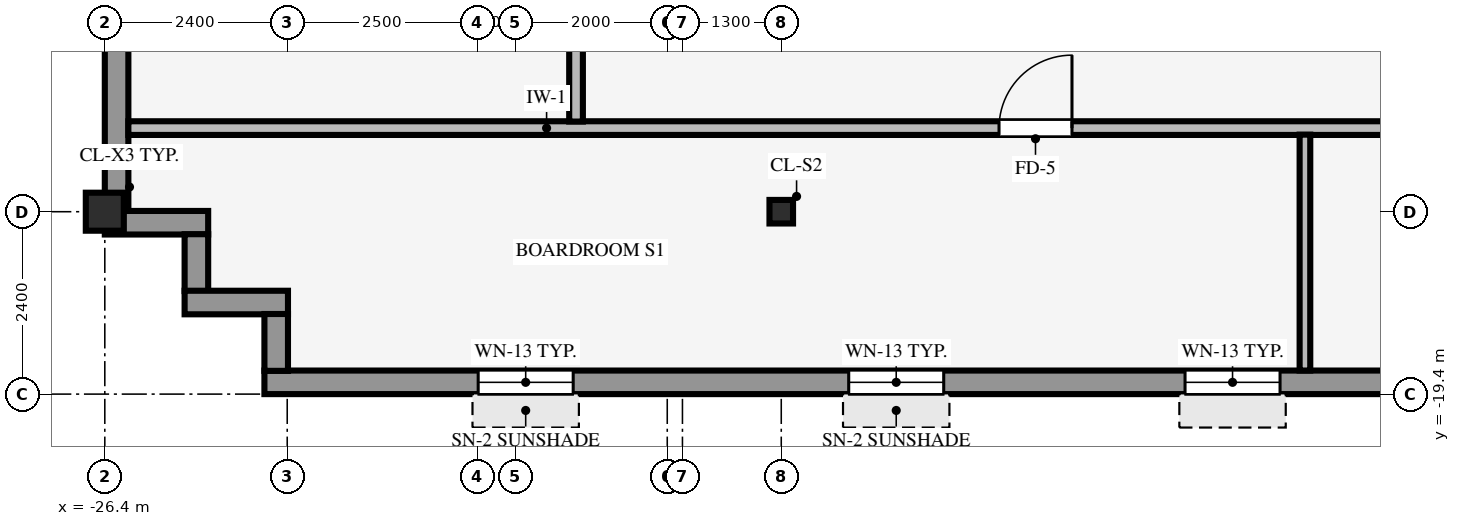
"""IFC4 building model, lengths in metres.
Left out: names, types, materials, properties, quantities, classifications, styles, units other than length and angle.
Written with IfcOpenShell. Run it as: python <this file> out.ifc"""

import sys

from ifc_helpers import new_model, si_unit, direction, frame, frame_2d, origin, origin_2d, place, context, subcontext, project, spatial, rectangle, hollow_rectangle, i_section, extrude, source, transform, mapped, element, fill, save


model = new_model("IFC4")
c1 = context("Model", 3, precision=1e-05, world=origin(), true_north=direction((0.0, 1.0)))
c2 = subcontext(c1, "Body", "Model", "MODEL_VIEW")
j1 = project(units=[si_unit("LENGTHUNIT", "METRE"), si_unit("PLANEANGLEUNIT", "RADIAN")], contexts=[c1])
p1 = place(None, origin())
s1 = spatial("IfcSite", under=j1, at=p1, CompositionType="ELEMENT")
p2 = place(p1, origin())
s2 = spatial("IfcBuilding", under=s1, at=p2, CompositionType="ELEMENT")
p3 = place(p2, frame((0.0, 0.0, 220.1)))
s3 = spatial("IfcBuildingStorey", under=s2, at=p3, CompositionType="ELEMENT", Elevation=220.1)
p4 = place(p3, frame((-26.4, -17.0, 0.0), z_axis=(0.0, 0.0, 1.0), x_axis=(1.0, 0.0, 0.0)))
e1 = element("IfcColumn", 1, at=p4, inside=s3, PredefinedType="COLUMN", context=c2, shape_type="SweptSolid", body=[
    extrude(hollow_rectangle(XDim=0.5, YDim=0.5, WallThickness=0.032, InnerFilletRadius=0.032, OuterFilletRadius=0.064, at=origin_2d()), origin(), (0.0, 0.0, 1.0), 3.37),
])
p5 = place(p3, frame((-17.5, -17.0, 0.0), z_axis=(0.0, 0.0, 1.0), x_axis=(1.0, 0.0, 0.0)))
e2 = element("IfcColumn", 2, at=p5, inside=s3, PredefinedType="COLUMN", context=c2, shape_type="SweptSolid", body=[
    extrude(i_section(OverallWidth=0.31, OverallDepth=0.31, WebThickness=0.015, FlangeThickness=0.015, FilletRadius=0.015, at=origin_2d()), origin(), (0.0, 0.0, 1.0), 3.37),
])
p6 = place(p3, frame((-24.3, -19.245, 0.0), z_axis=(0.0, 0.0, 1.0), x_axis=(1.0, 0.0, 0.0)))
e3 = element("IfcWall", 3, at=p6, inside=s3, PredefinedType="STANDARD", context=c2, shape_type="SweptSolid", body=[
    extrude(rectangle(XDim=41.0, YDim=0.31, at=frame_2d((20.5, 0.0))), origin(), (0.0, 0.0, 1.0), 2.705),
])
p7 = place(p6, frame((2.812, 0.0, 0.8)))
e4 = element("IfcOpeningElement", 4, at=p7, cuts=e3, PredefinedType="OPENING", context=c2, shape_type="SweptSolid", body=[
    extrude(rectangle(XDim=1.25, YDim=1.52, at=frame_2d((0.625, 0.76))), frame((0.0, 0.165, 0.0), z_axis=(0.0, -1.0, 0.0), x_axis=(1.0, 0.0, 0.0)), (0.0, 0.0, 1.0), 0.33),
])
p8 = place(p6, frame((7.688, 0.0, 0.8)))
e5 = element("IfcOpeningElement", 5, at=p8, cuts=e3, PredefinedType="OPENING", context=c2, shape_type="SweptSolid", body=[
    extrude(rectangle(XDim=1.25, YDim=1.52, at=frame_2d((0.625, 0.76))), frame((0.0, 0.165, 0.0), z_axis=(0.0, -1.0, 0.0), x_axis=(1.0, 0.0, 0.0)), (0.0, 0.0, 1.0), 0.33),
])
p9 = place(p6, frame((12.113, 0.0, 0.8)))
e6 = element("IfcOpeningElement", 6, at=p9, cuts=e3, PredefinedType="OPENING", context=c2, shape_type="SweptSolid", body=[
    extrude(rectangle(XDim=1.25, YDim=1.52, at=frame_2d((0.625, 0.76))), frame((0.0, 0.165, 0.0), z_axis=(0.0, -1.0, 0.0), x_axis=(1.0, 0.0, 0.0)), (0.0, 0.0, 1.0), 0.33),
])
p10 = place(p6, frame((17.438, 0.0, 0.8)))
e7 = element("IfcOpeningElement", 7, at=p10, cuts=e3, PredefinedType="OPENING", context=c2, shape_type="SweptSolid", body=[
    extrude(rectangle(XDim=1.25, YDim=1.52, at=frame_2d((0.625, 0.76))), frame((0.0, 0.165, 0.0), z_axis=(0.0, -1.0, 0.0), x_axis=(1.0, 0.0, 0.0)), (0.0, 0.0, 1.0), 0.33),
])
p11 = place(p6, frame((22.312, 0.0, 0.8)))
e8 = element("IfcOpeningElement", 8, at=p11, cuts=e3, PredefinedType="OPENING", context=c2, shape_type="SweptSolid", body=[
    extrude(rectangle(XDim=1.25, YDim=1.52, at=frame_2d((0.625, 0.76))), frame((0.0, 0.165, 0.0), z_axis=(0.0, -1.0, 0.0), x_axis=(1.0, 0.0, 0.0)), (0.0, 0.0, 1.0), 0.33),
])
p12 = place(p6, frame((27.188, 0.0, 0.8)))
e9 = element("IfcOpeningElement", 9, at=p12, cuts=e3, PredefinedType="OPENING", context=c2, shape_type="SweptSolid", body=[
    extrude(rectangle(XDim=1.25, YDim=1.52, at=frame_2d((0.625, 0.76))), frame((0.0, 0.165, 0.0), z_axis=(0.0, -1.0, 0.0), x_axis=(1.0, 0.0, 0.0)), (0.0, 0.0, 1.0), 0.33),
])
p13 = place(p6, frame((31.163, 0.0, 0.8)))
e10 = element("IfcOpeningElement", 10, at=p13, cuts=e3, PredefinedType="OPENING", context=c2, shape_type="SweptSolid", body=[
    extrude(rectangle(XDim=1.25, YDim=1.52, at=frame_2d((0.625, 0.76))), frame((0.0, 0.165, 0.0), z_axis=(0.0, -1.0, 0.0), x_axis=(1.0, 0.0, 0.0)), (0.0, 0.0, 1.0), 0.33),
])
p14 = place(p6, frame((36.938, 0.0, 0.8)))
e11 = element("IfcOpeningElement", 11, at=p14, cuts=e3, PredefinedType="OPENING", context=c2, shape_type="SweptSolid", body=[
    extrude(rectangle(XDim=1.25, YDim=1.52, at=frame_2d((0.625, 0.76))), frame((0.0, 0.165, 0.0), z_axis=(0.0, -1.0, 0.0), x_axis=(1.0, 0.0, 0.0)), (0.0, 0.0, 1.0), 0.33),
])
p15 = place(p3, frame((-26.245, -16.994, 0.0), z_axis=(0.0, 0.0, 1.0), x_axis=(0.0, 1.0, 0.0)))
e12 = element("IfcWall", 12, at=p15, inside=s3, PredefinedType="STANDARD", context=c2, shape_type="SweptSolid", body=[
    extrude(rectangle(XDim=33.988, YDim=0.31, at=frame_2d((16.994, 0.0))), origin(), (0.0, 0.0, 1.0), 2.705),
])
p16 = place(p15, frame((2.26, 0.0, 0.8)))
e13 = element("IfcOpeningElement", 13, at=p16, cuts=e12, PredefinedType="OPENING", context=c2, shape_type="SweptSolid", body=[
    extrude(rectangle(XDim=2.05, YDim=1.52, at=frame_2d((1.025, 0.76))), frame((0.0, 0.165, 0.0), z_axis=(0.0, -1.0, 0.0), x_axis=(1.0, 0.0, 0.0)), (0.0, 0.0, 1.0), 0.33),
])
p17 = place(p15, frame((8.18, 0.0, 0.8)))
e14 = element("IfcOpeningElement", 14, at=p17, cuts=e12, PredefinedType="OPENING", context=c2, shape_type="SweptSolid", body=[
    extrude(rectangle(XDim=2.05, YDim=1.52, at=frame_2d((1.025, 0.76))), frame((0.0, 0.165, 0.0), z_axis=(0.0, -1.0, 0.0), x_axis=(1.0, 0.0, 0.0)), (0.0, 0.0, 1.0), 0.33),
])
p18 = place(p15, frame((10.949, 0.0, 0.8)))
e15 = element("IfcOpeningElement", 15, at=p18, cuts=e12, PredefinedType="OPENING", context=c2, shape_type="SweptSolid", body=[
    extrude(rectangle(XDim=2.05, YDim=1.52, at=frame_2d((1.025, 0.76))), frame((0.0, 0.165, 0.0), z_axis=(0.0, -1.0, 0.0), x_axis=(1.0, 0.0, 0.0)), (0.0, 0.0, 1.0), 0.33),
])
p19 = place(p15, frame((20.539, 0.0, 0.8)))
e16 = element("IfcOpeningElement", 16, at=p19, cuts=e12, PredefinedType="OPENING", context=c2, shape_type="SweptSolid", body=[
    extrude(rectangle(XDim=2.05, YDim=1.52, at=frame_2d((1.025, 0.76))), frame((0.0, 0.165, 0.0), z_axis=(0.0, -1.0, 0.0), x_axis=(1.0, 0.0, 0.0)), (0.0, 0.0, 1.0), 0.33),
])
p20 = place(p15, frame((23.758, 0.0, 0.8)))
e17 = element("IfcOpeningElement", 17, at=p20, cuts=e12, PredefinedType="OPENING", context=c2, shape_type="SweptSolid", body=[
    extrude(rectangle(XDim=2.05, YDim=1.52, at=frame_2d((1.025, 0.76))), frame((0.0, 0.165, 0.0), z_axis=(0.0, -1.0, 0.0), x_axis=(1.0, 0.0, 0.0)), (0.0, 0.0, 1.0), 0.33),
])
p21 = place(p15, frame((29.678, 0.0, 0.8)))
e18 = element("IfcOpeningElement", 18, at=p21, cuts=e12, PredefinedType="OPENING", context=c2, shape_type="SweptSolid", body=[
    extrude(rectangle(XDim=2.05, YDim=1.52, at=frame_2d((1.025, 0.76))), frame((0.0, 0.165, 0.0), z_axis=(0.0, -1.0, 0.0), x_axis=(1.0, 0.0, 0.0)), (0.0, 0.0, 1.0), 0.33),
])
p22 = place(p3, frame((-26.4, -17.145, 0.0), z_axis=(0.0, 0.0, 1.0), x_axis=(1.0, 0.0, 0.0)))
e19 = element("IfcWall", 19, at=p22, inside=s3, PredefinedType="STANDARD", context=c2, shape_type="SweptSolid", body=[
    extrude(rectangle(XDim=1.36, YDim=0.31, at=frame_2d((0.68, 0.0))), origin(), (0.0, 0.0, 1.0), 2.816),
])
p23 = place(p3, frame((-25.195, -18.044, 0.0), z_axis=(0.0, 0.0, 1.0), x_axis=(0.0, 1.0, 0.0)))
e20 = element("IfcWall", 20, at=p23, inside=s3, PredefinedType="STANDARD", context=c2, shape_type="SweptSolid", body=[
    extrude(rectangle(XDim=0.748, YDim=0.31, at=frame_2d((0.374, 0.0))), origin(), (0.0, 0.0, 1.0), 2.816),
])
p24 = place(p3, frame((-25.35, -18.195, 0.0), z_axis=(0.0, 0.0, 1.0), x_axis=(1.0, 0.0, 0.0)))
e21 = element("IfcWall", 21, at=p24, inside=s3, PredefinedType="STANDARD", context=c2, shape_type="SweptSolid", body=[
    extrude(rectangle(XDim=1.36, YDim=0.31, at=frame_2d((0.68, 0.0))), origin(), (0.0, 0.0, 1.0), 2.816),
])
p25 = place(p3, frame((-24.145, -19.094, 0.0), z_axis=(0.0, 0.0, 1.0), x_axis=(0.0, 1.0, 0.0)))
e22 = element("IfcWall", 22, at=p25, inside=s3, PredefinedType="STANDARD", context=c2, shape_type="SweptSolid", body=[
    extrude(rectangle(XDim=0.748, YDim=0.31, at=frame_2d((0.374, 0.0))), origin(), (0.0, 0.0, 1.0), 2.816),
])
p26 = place(p3, frame((-26.09, -15.9, 0.0), z_axis=(0.0, 0.0, 1.0), x_axis=(1.0, 0.0, 0.0)))
e23 = element("IfcWall", 23, at=p26, inside=s3, PredefinedType="PARTITIONING", context=c2, shape_type="SweptSolid", body=[
    extrude(rectangle(XDim=35.09, YDim=0.18, at=frame_2d((17.545, 0.0))), origin(), (0.0, 0.0, 1.0), 3.36),
])
p27 = place(p26, frame((23.605, 0.0, 0.0)))
e24 = element("IfcOpeningElement", 24, at=p27, cuts=e23, PredefinedType="OPENING", context=c2, shape_type="SweptSolid", body=[
    extrude(rectangle(XDim=0.96, YDim=2.1, at=frame_2d((0.48, 1.05))), frame((0.0, 0.1, 0.0), z_axis=(0.0, -1.0, 0.0), x_axis=(1.0, 0.0, 0.0)), (0.0, 0.0, 1.0), 0.2),
])
p28 = place(p26, frame((11.455, 0.0, 0.0)))
e25 = element("IfcOpeningElement", 25, at=p28, cuts=e23, PredefinedType="OPENING", context=c2, shape_type="SweptSolid", body=[
    extrude(rectangle(XDim=0.96, YDim=2.1, at=frame_2d((0.48, 1.05))), frame((0.0, 0.1, 0.0), z_axis=(0.0, -1.0, 0.0), x_axis=(1.0, 0.0, 0.0)), (0.0, 0.0, 1.0), 0.2),
])
p29 = place(p3, frame((-20.2, -15.814, 0.0), z_axis=(0.0, 0.0, 1.0), x_axis=(0.0, 1.0, 0.0)))
e26 = element("IfcWall", 26, at=p29, inside=s3, PredefinedType="PARTITIONING", context=c2, shape_type="SweptSolid", body=[
    extrude(rectangle(XDim=31.628, YDim=0.18, at=frame_2d((15.814, 0.0))), origin(), (0.0, 0.0, 1.0), 3.36),
])
p30 = place(p29, frame((20.334, 0.0, 0.0)))
e27 = element("IfcOpeningElement", 27, at=p30, cuts=e26, PredefinedType="OPENING", context=c2, shape_type="SweptSolid", body=[
    extrude(rectangle(XDim=0.96, YDim=2.1, at=frame_2d((0.48, 1.05))), frame((0.0, 0.1, 0.0), z_axis=(0.0, -1.0, 0.0), x_axis=(1.0, 0.0, 0.0)), (0.0, 0.0, 1.0), 0.2),
])
p31 = place(p29, frame((6.834, 0.0, 0.0)))
e28 = element("IfcOpeningElement", 28, at=p31, cuts=e26, PredefinedType="OPENING", context=c2, shape_type="SweptSolid", body=[
    extrude(rectangle(XDim=0.96, YDim=2.1, at=frame_2d((0.48, 1.05))), frame((0.0, 0.1, 0.0), z_axis=(0.0, -1.0, 0.0), x_axis=(1.0, 0.0, 0.0)), (0.0, 0.0, 1.0), 0.2),
])
p32 = place(p3, frame((-10.61, -19.09, 0.0), z_axis=(0.0, 0.0, 1.0), x_axis=(0.0, 1.0, 0.0)))
e29 = element("IfcWall", 29, at=p32, inside=s3, PredefinedType="PARTITIONING", context=c2, shape_type="SweptSolid", body=[
    extrude(rectangle(XDim=3.104, YDim=0.14, at=frame_2d((1.552, 0.0))), origin(), (0.0, 0.0, 1.0), 3.36),
])
m1 = source(origin(), c2, "Body", "SweptSolid", [
    extrude(rectangle(XDim=1.25, YDim=1.52, at=frame_2d((0.625, 0.76))), frame((0.0, 0.03, 0.0), z_axis=(0.0, -1.0, 0.0), x_axis=(1.0, 0.0, 0.0)), (0.0, 0.0, 1.0), 0.06),
])
p33 = place(p7, origin())
e30 = element("IfcWindow", 30, at=p33, inside=s3, PartitioningType="SINGLE_PANEL", PredefinedType="WINDOW", context=c2, shape_type="MappedRepresentation", body=[
    mapped(m1, transform((0.0, 0.0, 0.0), scale=1.0)),
])
fill(e4, e30)
p34 = place(p8, origin())
e31 = element("IfcWindow", 31, at=p34, inside=s3, PartitioningType="SINGLE_PANEL", PredefinedType="WINDOW", context=c2, shape_type="MappedRepresentation", body=[
    mapped(m1, transform((0.0, 0.0, 0.0), scale=1.0)),
])
fill(e5, e31)
p35 = place(p9, origin())
e32 = element("IfcWindow", 32, at=p35, inside=s3, PartitioningType="SINGLE_PANEL", PredefinedType="WINDOW", context=c2, shape_type="MappedRepresentation", body=[
    mapped(m1, transform((0.0, 0.0, 0.0), scale=1.0)),
])
fill(e6, e32)
m2 = source(origin(), c2, "Body", "SweptSolid", [
    extrude(rectangle(XDim=0.96, YDim=2.1, at=frame_2d((0.48, 1.05))), frame((0.0, 0.025, 0.0), z_axis=(0.0, -1.0, 0.0), x_axis=(1.0, 0.0, 0.0)), (0.0, 0.0, 1.0), 0.05),
])
p36 = place(p28, origin())
e33 = element("IfcDoor", 33, at=p36, inside=s3, OperationType="SINGLE_SWING_RIGHT", PredefinedType="DOOR", context=c2, shape_type="MappedRepresentation", body=[
    mapped(m2, transform((0.0, 0.0, 0.0), scale=1.0)),
])
fill(e25, e33)
save(model, sys.argv[1])
